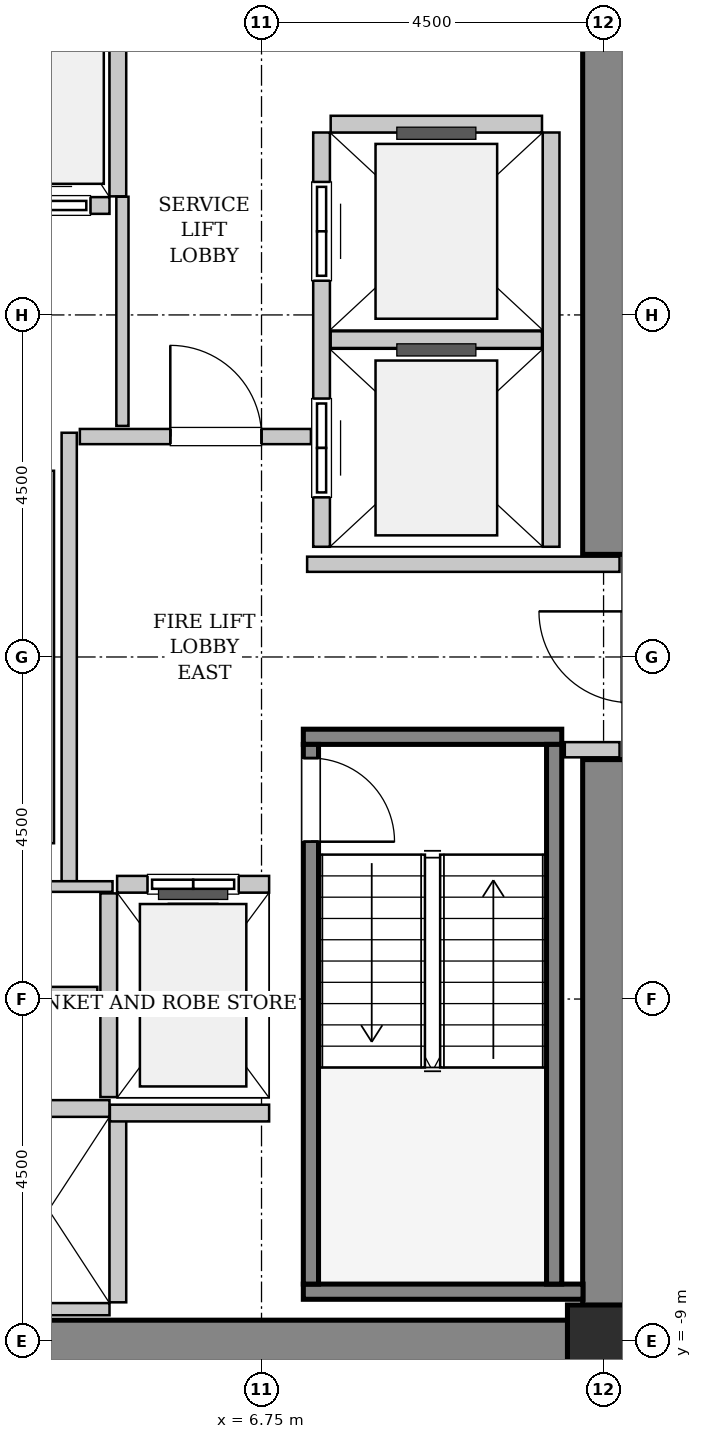
"""IFC4 building model, lengths in metres.
Left out: names, types, materials, properties, quantities, classifications, styles, units other than length and angle.
Written with IfcOpenShell. Run it as: python <this file> out.ifc"""

import sys

from ifc_helpers import new_model, si_unit, direction, frame, frame_2d, origin, origin_2d, place, context, subcontext, project, spatial, rectangle, hollow_rectangle, extrude, source, transform, mapped, element, fill, save


model = new_model("IFC4")
c1 = context("Model", 3, precision=1e-05, world=origin(), true_north=direction((0.0, 1.0)))
c2 = subcontext(c1, "Body", "Model", "MODEL_VIEW")
j1 = project(units=[si_unit("LENGTHUNIT", "METRE"), si_unit("PLANEANGLEUNIT", "RADIAN")], contexts=[c1])
p1 = place(None, origin())
s1 = spatial("IfcSite", under=j1, at=p1, CompositionType="ELEMENT")
p2 = place(p1, origin())
s2 = spatial("IfcBuilding", under=s1, at=p2, CompositionType="ELEMENT")
p3 = place(p2, frame((0.0, 0.0, 121.2)))
s3 = spatial("IfcBuildingStorey", under=s2, at=p3, CompositionType="ELEMENT", Elevation=121.2)
m1 = source(origin(), c2, "Body", "SweptSolid", [
    extrude(rectangle(XDim=9.975, YDim=0.55, at=frame_2d((4.987, 0.0))), origin(), (0.0, 0.0, 1.0), 3.8),
])
p4 = place(p3, frame((1.55, -9.0, 0.0), z_axis=(0.0, 0.0, 1.0), x_axis=(1.0, 0.0, 0.0)))
e1 = element("IfcWall", 1, at=p4, inside=s3, PredefinedType="SHEAR", context=c2, shape_type="MappedRepresentation", body=[
    mapped(m1, transform((0.0, 0.0, 0.0), x_axis=(1.0, 0.0, 0.0), y_axis=(0.0, 1.0, 0.0), z_axis=(0.0, 0.0, 1.0), scale=1.0)),
])
m2 = source(origin(), c2, "Body", "SweptSolid", [
    extrude(rectangle(XDim=7.375, YDim=0.55, at=frame_2d((3.688, 0.0))), origin(), (0.0, 0.0, 1.0), 3.8),
])
for number, where, z_axis, x_axis in (
    (2, (11.25, -8.725, 0.0), (0.0, 0.0, 1.0), (0.0, 1.0, 0.0)),
    (3, (11.25, 1.35, 0.0), (0.0, 0.0, 1.0), (0.0, 1.0, 0.0)),
):
    element("IfcWall", number, at=place(p3, frame(where, z_axis=z_axis, x_axis=x_axis)), inside=s3, PredefinedType="SHEAR", context=c2, shape_type="MappedRepresentation", body=[
        mapped(m2, transform((0.0, 0.0, 0.0), x_axis=(1.0, 0.0, 0.0), y_axis=(0.0, 1.0, 0.0), z_axis=(0.0, 0.0, 1.0), scale=1.0)),
    ])
m3 = source(origin(), c2, "Body", "SweptSolid", [
    extrude(hollow_rectangle(XDim=0.95, YDim=0.95, WallThickness=0.045, InnerFilletRadius=0.045, OuterFilletRadius=0.09, at=origin_2d()), origin(), (0.0, 0.0, 1.0), 3.8),
])
p5 = place(p3, frame((11.25, -9.0, 0.0), z_axis=(0.0, 0.0, 1.0), x_axis=(1.0, 0.0, 0.0)))
e4 = element("IfcColumn", 4, at=p5, inside=s3, PredefinedType="COLUMN", context=c2, shape_type="MappedRepresentation", body=[
    mapped(m3, transform((0.0, 0.0, 0.0), x_axis=(1.0, 0.0, 0.0), y_axis=(0.0, 1.0, 0.0), z_axis=(0.0, 0.0, 1.0), scale=1.0)),
])
m4 = source(origin(), c2, "Body", "SweptSolid", [
    extrude(rectangle(XDim=3.4, YDim=0.2, at=frame_2d((1.7, 0.0))), origin(), (0.0, 0.0, 1.0), 3.8),
])
p6 = place(p3, frame((7.3, -1.05, 0.0), z_axis=(0.0, 0.0, 1.0), x_axis=(1.0, 0.0, 0.0)))
e5 = element("IfcWall", 5, at=p6, inside=s3, PredefinedType="SOLIDWALL", context=c2, shape_type="MappedRepresentation", body=[
    mapped(m4, transform((0.0, 0.0, 0.0), x_axis=(1.0, 0.0, 0.0), y_axis=(0.0, 1.0, 0.0), z_axis=(0.0, 0.0, 1.0), scale=1.0)),
])
m5 = source(origin(), c2, "Body", "SweptSolid", [
    extrude(rectangle(XDim=3.68, YDim=0.2, at=frame_2d((1.84, 0.0))), origin(), (0.0, 0.0, 1.0), 3.8),
])
p7 = place(p3, frame((7.3, -8.35, 0.0), z_axis=(0.0, 0.0, 1.0), x_axis=(1.0, 0.0, 0.0)))
e6 = element("IfcWall", 6, at=p7, inside=s3, PredefinedType="SOLIDWALL", context=c2, shape_type="MappedRepresentation", body=[
    mapped(m5, transform((0.0, 0.0, 0.0), x_axis=(1.0, 0.0, 0.0), y_axis=(0.0, 1.0, 0.0), z_axis=(0.0, 0.0, 1.0), scale=1.0)),
])
m6 = source(origin(), c2, "Body", "SweptSolid", [
    extrude(rectangle(XDim=7.1, YDim=0.2, at=frame_2d((3.55, 0.0))), origin(), (0.0, 0.0, 1.0), 3.8),
])
p8 = place(p3, frame((7.4, -1.15, 0.0), z_axis=(0.0, 0.0, 1.0), x_axis=(0.0, -1.0, 0.0)))
e7 = element("IfcWall", 7, at=p8, inside=s3, PredefinedType="SOLIDWALL", context=c2, shape_type="MappedRepresentation", body=[
    mapped(m6, transform((0.0, 0.0, 0.0), x_axis=(1.0, 0.0, 0.0), y_axis=(0.0, 1.0, 0.0), z_axis=(0.0, 0.0, 1.0), scale=1.0)),
])
p9 = place(p8, frame((0.18, 0.0, 0.0)))
e8 = element("IfcOpeningElement", 8, at=p9, cuts=e7, PredefinedType="OPENING", context=c2, shape_type="SweptSolid", body=[
    extrude(rectangle(XDim=1.1, YDim=2.15, at=frame_2d((0.55, 1.075))), frame((0.0, 0.11, 0.0), z_axis=(0.0, -1.0, 0.0), x_axis=(1.0, 0.0, 0.0)), (0.0, 0.0, 1.0), 0.22),
])
p10 = place(p3, frame((10.6, -1.15, 0.0), z_axis=(0.0, 0.0, 1.0), x_axis=(0.0, -1.0, 0.0)))
e9 = element("IfcWall", 9, at=p10, inside=s3, PredefinedType="SOLIDWALL", context=c2, shape_type="MappedRepresentation", body=[
    mapped(m6, transform((0.0, 0.0, 0.0), x_axis=(1.0, 0.0, 0.0), y_axis=(0.0, 1.0, 0.0), z_axis=(0.0, 0.0, 1.0), scale=1.0)),
])
m7 = source(origin(), c2, "Body", "SweptSolid", [
    extrude(rectangle(XDim=2.0, YDim=0.22, at=frame_2d((1.0, 0.0))), origin(), (0.0, 0.0, 1.0), 3.535),
])
p11 = place(p3, frame((6.85, -2.99, 0.0), z_axis=(0.0, 0.0, 1.0), x_axis=(-1.0, 0.0, 0.0)))
e10 = element("IfcWall", 10, at=p11, inside=s3, PredefinedType="SOLIDWALL", context=c2, shape_type="MappedRepresentation", body=[
    mapped(m7, transform((0.0, 0.0, 0.0), x_axis=(1.0, 0.0, 0.0), y_axis=(0.0, 1.0, 0.0), z_axis=(0.0, 0.0, 1.0), scale=1.0)),
])
p12 = place(p11, frame((0.4, 0.0, 0.0)))
e11 = element("IfcOpeningElement", 11, at=p12, cuts=e10, PredefinedType="OPENING", context=c2, shape_type="SweptSolid", body=[
    extrude(rectangle(XDim=1.2, YDim=2.2, at=frame_2d((0.6, 1.1))), frame((0.0, 0.12, 0.0), z_axis=(0.0, -1.0, 0.0), x_axis=(1.0, 0.0, 0.0)), (0.0, 0.0, 1.0), 0.24),
])
m8 = source(origin(), c2, "Body", "SweptSolid", [
    extrude(rectangle(XDim=2.68, YDim=0.22, at=frame_2d((1.34, 0.0))), origin(), (0.0, 0.0, 1.0), 3.535),
])
p13 = place(p3, frame((4.74, -3.11, 0.0), z_axis=(0.0, 0.0, 1.0), x_axis=(0.0, -1.0, 0.0)))
e12 = element("IfcWall", 12, at=p13, inside=s3, PredefinedType="SOLIDWALL", context=c2, shape_type="MappedRepresentation", body=[
    mapped(m8, transform((0.0, 0.0, 0.0), x_axis=(1.0, 0.0, 0.0), y_axis=(0.0, 1.0, 0.0), z_axis=(0.0, 0.0, 1.0), scale=1.0)),
])
m9 = source(origin(), c2, "Body", "SweptSolid", [
    extrude(rectangle(XDim=5.45, YDim=0.22, at=frame_2d((2.725, 0.0))), origin(), (0.0, 0.0, 1.0), 3.535),
])
p14 = place(p3, frame((7.54, 6.9, 0.0), z_axis=(0.0, 0.0, 1.0), x_axis=(0.0, -1.0, 0.0)))
e13 = element("IfcWall", 13, at=p14, inside=s3, PredefinedType="SOLIDWALL", context=c2, shape_type="MappedRepresentation", body=[
    mapped(m9, transform((0.0, 0.0, 0.0), x_axis=(1.0, 0.0, 0.0), y_axis=(0.0, 1.0, 0.0), z_axis=(0.0, 0.0, 1.0), scale=1.0)),
])
p15 = place(p14, frame((3.5, 0.0, 0.0)))
e14 = element("IfcOpeningElement", 14, at=p15, cuts=e13, PredefinedType="OPENING", context=c2, shape_type="SweptSolid", body=[
    extrude(rectangle(XDim=1.3, YDim=2.3, at=frame_2d((0.65, 1.15))), frame((0.0, 0.12, 0.0), z_axis=(0.0, -1.0, 0.0), x_axis=(1.0, 0.0, 0.0)), (0.0, 0.0, 1.0), 0.24),
])
p16 = place(p14, frame((0.65, 0.0, 0.0)))
e15 = element("IfcOpeningElement", 15, at=p16, cuts=e13, PredefinedType="OPENING", context=c2, shape_type="SweptSolid", body=[
    extrude(rectangle(XDim=1.3, YDim=2.3, at=frame_2d((0.65, 1.15))), frame((0.0, 0.12, 0.0), z_axis=(0.0, -1.0, 0.0), x_axis=(1.0, 0.0, 0.0)), (0.0, 0.0, 1.0), 0.24),
])
p17 = place(p3, frame((10.56, 1.45, 0.0), z_axis=(0.0, 0.0, 1.0), x_axis=(0.0, 1.0, 0.0)))
e16 = element("IfcWall", 16, at=p17, inside=s3, PredefinedType="SOLIDWALL", context=c2, shape_type="MappedRepresentation", body=[
    mapped(m9, transform((0.0, 0.0, 0.0), x_axis=(1.0, 0.0, 0.0), y_axis=(0.0, 1.0, 0.0), z_axis=(0.0, 0.0, 1.0), scale=1.0)),
])
m10 = source(origin(), c2, "Body", "SweptSolid", [
    extrude(rectangle(XDim=2.78, YDim=0.22, at=frame_2d((1.39, 0.0))), origin(), (0.0, 0.0, 1.0), 3.535),
])
for number, where, z_axis, x_axis in (
    (17, (7.66, 4.175, 0.0), (0.0, 0.0, 1.0), (1.0, 0.0, 0.0)),
    (18, (10.44, 7.01, 0.0), (0.0, 0.0, 1.0), (-1.0, 0.0, 0.0)),
):
    element("IfcWall", number, at=place(p3, frame(where, z_axis=z_axis, x_axis=x_axis)), inside=s3, PredefinedType="SOLIDWALL", context=c2, shape_type="MappedRepresentation", body=[
        mapped(m10, transform((0.0, 0.0, 0.0), x_axis=(1.0, 0.0, 0.0), y_axis=(0.0, 1.0, 0.0), z_axis=(0.0, 0.0, 1.0), scale=1.0)),
    ])
m11 = source(origin(), c2, "Body", "SweptSolid", [
    extrude(rectangle(XDim=3.2, YDim=0.22, at=frame_2d((1.6, 0.0))), origin(), (0.0, 0.0, 1.0), 3.535),
])
p18 = place(p3, frame((1.55, 5.94, 0.0), z_axis=(0.0, 0.0, 1.0), x_axis=(1.0, 0.0, 0.0)))
e19 = element("IfcWall", 19, at=p18, inside=s3, PredefinedType="SOLIDWALL", context=c2, shape_type="MappedRepresentation", body=[
    mapped(m11, transform((0.0, 0.0, 0.0), x_axis=(1.0, 0.0, 0.0), y_axis=(0.0, 1.0, 0.0), z_axis=(0.0, 0.0, 1.0), scale=1.0)),
])
p19 = place(p18, frame((0.225, 0.0, 0.0)))
e20 = element("IfcOpeningElement", 20, at=p19, cuts=e19, PredefinedType="OPENING", context=c2, shape_type="SweptSolid", body=[
    extrude(rectangle(XDim=1.1, YDim=2.2, at=frame_2d((0.55, 1.1))), frame((0.0, 0.12, 0.0), z_axis=(0.0, -1.0, 0.0), x_axis=(1.0, 0.0, 0.0)), (0.0, 0.0, 1.0), 0.24),
])
p20 = place(p18, frame((1.85, 0.0, 0.0)))
e21 = element("IfcOpeningElement", 21, at=p20, cuts=e19, PredefinedType="OPENING", context=c2, shape_type="SweptSolid", body=[
    extrude(rectangle(XDim=1.1, YDim=2.2, at=frame_2d((0.55, 1.1))), frame((0.0, 0.12, 0.0), z_axis=(0.0, -1.0, 0.0), x_axis=(1.0, 0.0, 0.0)), (0.0, 0.0, 1.0), 0.24),
])
m12 = source(origin(), c2, "Body", "SweptSolid", [
    extrude(rectangle(XDim=2.43, YDim=0.22, at=frame_2d((1.215, 0.0))), origin(), (0.0, 0.0, 1.0), 3.535),
])
p21 = place(p3, frame((4.86, 6.06, 0.0), z_axis=(0.0, 0.0, 1.0), x_axis=(0.0, 1.0, 0.0)))
e22 = element("IfcWall", 22, at=p21, inside=s3, PredefinedType="SOLIDWALL", context=c2, shape_type="MappedRepresentation", body=[
    mapped(m12, transform((0.0, 0.0, 0.0), x_axis=(1.0, 0.0, 0.0), y_axis=(0.0, 1.0, 0.0), z_axis=(0.0, 0.0, 1.0), scale=1.0)),
])
p22 = place(p3, frame((4.75, -5.94, 0.0), z_axis=(0.0, 0.0, 1.0), x_axis=(-1.0, 0.0, 0.0)))
e23 = element("IfcWall", 23, at=p22, inside=s3, PredefinedType="SOLIDWALL", context=c2, shape_type="MappedRepresentation", body=[
    mapped(m11, transform((0.0, 0.0, 0.0), x_axis=(1.0, 0.0, 0.0), y_axis=(0.0, 1.0, 0.0), z_axis=(0.0, 0.0, 1.0), scale=1.0)),
])
m13 = source(origin(), c2, "Body", "SweptSolid", [
    extrude(rectangle(XDim=3.2, YDim=0.16, at=frame_2d((1.6, 0.0))), origin(), (0.0, 0.0, 1.0), 2.425),
])
p23 = place(p3, frame((1.55, -8.58, 0.0), z_axis=(0.0, 0.0, 1.0), x_axis=(1.0, 0.0, 0.0)))
e24 = element("IfcWall", 24, at=p23, inside=s3, PredefinedType="PARTITIONING", context=c2, shape_type="MappedRepresentation", body=[
    mapped(m13, transform((0.0, 0.0, 0.0), x_axis=(1.0, 0.0, 0.0), y_axis=(0.0, 1.0, 0.0), z_axis=(0.0, 0.0, 1.0), scale=1.0)),
])
p24 = place(p3, frame((4.86, -8.49, 0.0), z_axis=(0.0, 0.0, 1.0), x_axis=(0.0, 1.0, 0.0)))
e25 = element("IfcWall", 25, at=p24, inside=s3, PredefinedType="SOLIDWALL", context=c2, shape_type="MappedRepresentation", body=[
    mapped(m12, transform((0.0, 0.0, 0.0), x_axis=(1.0, 0.0, 0.0), y_axis=(0.0, 1.0, 0.0), z_axis=(0.0, 0.0, 1.0), scale=1.0)),
])
m14 = source(origin(), c2, "Body", "SweptSolid", [
    extrude(rectangle(XDim=4.9, YDim=0.22, at=frame_2d((2.45, 0.0))), origin(), (0.0, 0.0, 1.0), 3.535),
])
p25 = place(p3, frame((3.91, -2.45, 0.0), z_axis=(0.0, 0.0, 1.0), x_axis=(0.0, 1.0, 0.0)))
e26 = element("IfcWall", 26, at=p25, inside=s3, PredefinedType="SOLIDWALL", context=c2, shape_type="MappedRepresentation", body=[
    mapped(m14, transform((0.0, 0.0, 0.0), x_axis=(1.0, 0.0, 0.0), y_axis=(0.0, 1.0, 0.0), z_axis=(0.0, 0.0, 1.0), scale=1.0)),
])
m15 = source(origin(), c2, "Body", "SweptSolid", [
    extrude(rectangle(XDim=2.095, YDim=0.22, at=frame_2d((1.048, 0.0))), origin(), (0.0, 0.0, 1.0), 3.535),
])
p26 = place(p3, frame((4.755, -6.0, 0.0), z_axis=(0.0, 0.0, 1.0), x_axis=(1.0, 0.0, 0.0)))
e27 = element("IfcWall", 27, at=p26, inside=s3, PredefinedType="SOLIDWALL", context=c2, shape_type="MappedRepresentation", body=[
    mapped(m15, transform((0.0, 0.0, 0.0), x_axis=(1.0, 0.0, 0.0), y_axis=(0.0, 1.0, 0.0), z_axis=(0.0, 0.0, 1.0), scale=1.0)),
])
m16 = source(origin(), c2, "Body", "SweptSolid", [
    extrude(rectangle(XDim=5.9, YDim=0.2, at=frame_2d((2.95, 0.0))), origin(), (0.0, 0.0, 1.0), 3.535),
])
p27 = place(p3, frame((4.22, -2.95, 0.0), z_axis=(0.0, 0.0, 1.0), x_axis=(0.0, 1.0, 0.0)))
e28 = element("IfcWall", 28, at=p27, inside=s3, PredefinedType="PARTITIONING", context=c2, shape_type="MappedRepresentation", body=[
    mapped(m16, transform((0.0, 0.0, 0.0), x_axis=(1.0, 0.0, 0.0), y_axis=(0.0, 1.0, 0.0), z_axis=(0.0, 0.0, 1.0), scale=1.0)),
])
m17 = source(origin(), c2, "Body", "SweptSolid", [
    extrude(rectangle(XDim=3.04, YDim=0.2, at=frame_2d((1.52, 0.0))), origin(), (0.0, 0.0, 1.0), 3.535),
])
p28 = place(p3, frame((4.36, 2.9, 0.0), z_axis=(0.0, 0.0, 1.0), x_axis=(1.0, 0.0, 0.0)))
e29 = element("IfcWall", 29, at=p28, inside=s3, PredefinedType="PARTITIONING", context=c2, shape_type="MappedRepresentation", body=[
    mapped(m17, transform((0.0, 0.0, 0.0), x_axis=(1.0, 0.0, 0.0), y_axis=(0.0, 1.0, 0.0), z_axis=(0.0, 0.0, 1.0), scale=1.0)),
])
p29 = place(p28, frame((1.19, 0.0, 0.0)))
e30 = element("IfcOpeningElement", 30, at=p29, cuts=e29, PredefinedType="OPENING", context=c2, shape_type="SweptSolid", body=[
    extrude(rectangle(XDim=1.2, YDim=2.15, at=frame_2d((0.6, 1.075))), frame((0.0, 0.11, 0.0), z_axis=(0.0, -1.0, 0.0), x_axis=(1.0, 0.0, 0.0)), (0.0, 0.0, 1.0), 0.22),
])
m18 = source(origin(), c2, "Body", "SweptSolid", [
    extrude(rectangle(XDim=4.11, YDim=0.2, at=frame_2d((2.055, 0.0))), origin(), (0.0, 0.0, 1.0), 3.535),
])
p30 = place(p3, frame((7.35, 1.22, 0.0), z_axis=(0.0, 0.0, 1.0), x_axis=(1.0, 0.0, 0.0)))
e31 = element("IfcWall", 31, at=p30, inside=s3, PredefinedType="PARTITIONING", context=c2, shape_type="MappedRepresentation", body=[
    mapped(m18, transform((0.0, 0.0, 0.0), x_axis=(1.0, 0.0, 0.0), y_axis=(0.0, 1.0, 0.0), z_axis=(0.0, 0.0, 1.0), scale=1.0)),
])
m19 = source(origin(), c2, "Body", "SweptSolid", [
    extrude(rectangle(XDim=0.72, YDim=0.2, at=frame_2d((0.36, 0.0))), origin(), (0.0, 0.0, 1.0), 3.535),
])
p31 = place(p3, frame((10.74, -1.22, 0.0), z_axis=(0.0, 0.0, 1.0), x_axis=(1.0, 0.0, 0.0)))
e32 = element("IfcWall", 32, at=p31, inside=s3, PredefinedType="PARTITIONING", context=c2, shape_type="MappedRepresentation", body=[
    mapped(m19, transform((0.0, 0.0, 0.0), x_axis=(1.0, 0.0, 0.0), y_axis=(0.0, 1.0, 0.0), z_axis=(0.0, 0.0, 1.0), scale=1.0)),
])
m20 = source(origin(), c2, "Body", "SweptSolid", [
    extrude(rectangle(XDim=3.015, YDim=0.16, at=frame_2d((1.507, 0.0))), origin(), (0.0, 0.0, 1.0), 3.535),
])
p32 = place(p3, frame((4.92, 3.04, 0.0), z_axis=(0.0, 0.0, 1.0), x_axis=(0.0, 1.0, 0.0)))
e33 = element("IfcWall", 33, at=p32, inside=s3, PredefinedType="PARTITIONING", context=c2, shape_type="MappedRepresentation", body=[
    mapped(m20, transform((0.0, 0.0, 0.0), x_axis=(1.0, 0.0, 0.0), y_axis=(0.0, 1.0, 0.0), z_axis=(0.0, 0.0, 1.0), scale=1.0)),
])
m21 = source(origin(), c2, "Body", "SweptSolid", [
    extrude(rectangle(XDim=3.15, YDim=0.14, at=frame_2d((1.575, 0.0))), origin(), (0.0, 0.0, 1.0), 3.535),
])
p33 = place(p3, frame((1.64, -3.02, 0.0), z_axis=(0.0, 0.0, 1.0), x_axis=(1.0, 0.0, 0.0)))
e34 = element("IfcWall", 34, at=p33, inside=s3, PredefinedType="PARTITIONING", context=c2, shape_type="MappedRepresentation", body=[
    mapped(m21, transform((0.0, 0.0, 0.0), x_axis=(1.0, 0.0, 0.0), y_axis=(0.0, 1.0, 0.0), z_axis=(0.0, 0.0, 1.0), scale=1.0)),
])
m22 = source(origin(), c2, "Body", "SweptSolid", [
    extrude(rectangle(XDim=2.95, YDim=0.14, at=frame_2d((1.475, 0.0))), origin(), (0.0, 0.0, 1.0), 3.535),
])
p34 = place(p3, frame((1.64, -4.41, 0.0), z_axis=(0.0, 0.0, 1.0), x_axis=(1.0, 0.0, 0.0)))
e35 = element("IfcWall", 35, at=p34, inside=s3, PredefinedType="PARTITIONING", context=c2, shape_type="MappedRepresentation", body=[
    mapped(m22, transform((0.0, 0.0, 0.0), x_axis=(1.0, 0.0, 0.0), y_axis=(0.0, 1.0, 0.0), z_axis=(0.0, 0.0, 1.0), scale=1.0)),
])
m23 = source(origin(), c2, "Body", "SweptSolid", [
    extrude(rectangle(XDim=1.1, YDim=2.15, at=frame_2d((0.55, 1.075))), frame((0.0, 0.025, 0.0), z_axis=(0.0, -1.0, 0.0), x_axis=(1.0, 0.0, 0.0)), (0.0, 0.0, 1.0), 0.05),
])
p35 = place(p9, origin())
e36 = element("IfcDoor", 36, at=p35, inside=s3, OperationType="SINGLE_SWING_RIGHT", PredefinedType="DOOR", context=c2, shape_type="MappedRepresentation", body=[
    mapped(m23, transform((0.0, 0.0, 0.0), x_axis=(1.0, 0.0, 0.0), y_axis=(0.0, 1.0, 0.0), z_axis=(0.0, 0.0, 1.0), scale=1.0)),
])
fill(e8, e36)
m24 = source(origin(), c2, "Body", "SweptSolid", [
    extrude(rectangle(XDim=1.2, YDim=2.2, at=frame_2d((0.6, 1.1))), frame((0.0, 0.025, 0.0), z_axis=(0.0, -1.0, 0.0), x_axis=(1.0, 0.0, 0.0)), (0.0, 0.0, 1.0), 0.05),
])
p36 = place(p12, origin())
e37 = element("IfcDoor", 37, at=p36, inside=s3, OperationType="SLIDING_TO_LEFT", PredefinedType="DOOR", context=c2, shape_type="MappedRepresentation", body=[
    mapped(m24, transform((0.0, 0.0, 0.0), x_axis=(1.0, 0.0, 0.0), y_axis=(0.0, 1.0, 0.0), z_axis=(0.0, 0.0, 1.0), scale=1.0)),
])
fill(e11, e37)
m25 = source(origin(), c2, "Body", "SweptSolid", [
    extrude(rectangle(XDim=1.3, YDim=2.3, at=frame_2d((0.65, 1.15))), frame((0.0, 0.025, 0.0), z_axis=(0.0, -1.0, 0.0), x_axis=(1.0, 0.0, 0.0)), (0.0, 0.0, 1.0), 0.05),
])
p37 = place(p15, origin())
e38 = element("IfcDoor", 38, at=p37, inside=s3, OperationType="SLIDING_TO_RIGHT", PredefinedType="DOOR", context=c2, shape_type="MappedRepresentation", body=[
    mapped(m25, transform((0.0, 0.0, 0.0), x_axis=(1.0, 0.0, 0.0), y_axis=(0.0, 1.0, 0.0), z_axis=(0.0, 0.0, 1.0), scale=1.0)),
])
fill(e14, e38)
p38 = place(p16, origin())
e39 = element("IfcDoor", 39, at=p38, inside=s3, OperationType="SLIDING_TO_RIGHT", PredefinedType="DOOR", context=c2, shape_type="MappedRepresentation", body=[
    mapped(m25, transform((0.0, 0.0, 0.0), x_axis=(1.0, 0.0, 0.0), y_axis=(0.0, 1.0, 0.0), z_axis=(0.0, 0.0, 1.0), scale=1.0)),
])
fill(e15, e39)
m26 = source(origin(), c2, "Body", "SweptSolid", [
    extrude(rectangle(XDim=1.1, YDim=2.2, at=frame_2d((0.55, 1.1))), frame((0.0, 0.025, 0.0), z_axis=(0.0, -1.0, 0.0), x_axis=(1.0, 0.0, 0.0)), (0.0, 0.0, 1.0), 0.05),
])
p39 = place(p20, origin())
e40 = element("IfcDoor", 40, at=p39, inside=s3, OperationType="DOUBLE_DOOR_SLIDING", PredefinedType="DOOR", context=c2, shape_type="MappedRepresentation", body=[
    mapped(m26, transform((0.0, 0.0, 0.0), x_axis=(1.0, 0.0, 0.0), y_axis=(0.0, 1.0, 0.0), z_axis=(0.0, 0.0, 1.0), scale=1.0)),
])
fill(e21, e40)
m27 = source(origin(), c2, "Body", "SweptSolid", [
    extrude(rectangle(XDim=1.2, YDim=2.15, at=frame_2d((0.6, 1.075))), frame((0.0, 0.025, 0.0), z_axis=(0.0, -1.0, 0.0), x_axis=(1.0, 0.0, 0.0)), (0.0, 0.0, 1.0), 0.05),
])
p40 = place(p29, origin())
e41 = element("IfcDoor", 41, at=p40, inside=s3, OperationType="SINGLE_SWING_LEFT", PredefinedType="DOOR", context=c2, shape_type="MappedRepresentation", body=[
    mapped(m27, transform((0.0, 0.0, 0.0), x_axis=(1.0, 0.0, 0.0), y_axis=(0.0, 1.0, 0.0), z_axis=(0.0, 0.0, 1.0), scale=1.0)),
])
fill(e30, e41)
save(model, sys.argv[1])
